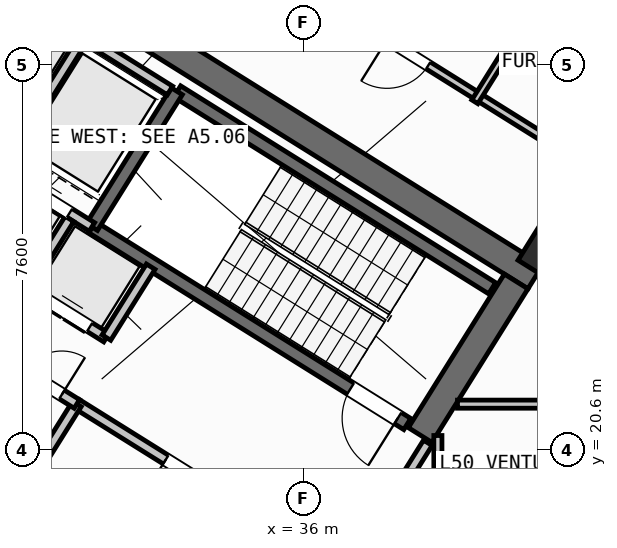
"""IFC4 building model, lengths in metres.
Left out: names, types, materials, properties, quantities, classifications, styles, units other than length and angle.
Written with IfcOpenShell. Run it as: python <this file> out.ifc"""

import sys

from ifc_helpers import new_model, si_unit, direction, frame, frame_2d, origin, origin_2d, place, context, subcontext, project, spatial, rectangle, hollow_rectangle, extrude, source, transform, mapped, element, fill, save


model = new_model("IFC4")
c1 = context("Model", 3, precision=1e-05, world=origin(), true_north=direction((0.0, 1.0)))
c2 = subcontext(c1, "Body", "Model", "MODEL_VIEW")
j1 = project(units=[si_unit("LENGTHUNIT", "METRE"), si_unit("PLANEANGLEUNIT", "RADIAN")], contexts=[c1])
p1 = place(None, origin())
s1 = spatial("IfcSite", under=j1, at=p1, CompositionType="ELEMENT")
p2 = place(p1, origin())
s2 = spatial("IfcBuilding", under=s1, at=p2, CompositionType="ELEMENT")
p3 = place(p2, frame((0.0, 0.0, 199.5)))
s3 = spatial("IfcBuildingStorey", under=s2, at=p3, CompositionType="ELEMENT", Elevation=199.5)
p4 = place(p3, frame((40.573, 24.01, 0.0), z_axis=(0.0, 0.0, 1.0), x_axis=(-0.848047359947, 0.529920442413, 0.0)))
e1 = element("IfcWall", 1, at=p4, inside=s3, PredefinedType="SHEAR", context=c2, shape_type="SweptSolid", body=[
    extrude(rectangle(XDim=13.14, YDim=0.55, at=frame_2d((6.57, 0.0))), origin(), (0.0, 0.0, 1.0), 4.25),
])
p5 = place(p3, frame((40.194, 23.922, 0.0), z_axis=(0.0, 0.0, 1.0), x_axis=(-0.529888438328, -0.848067357541, 0.0)))
e2 = element("IfcWall", 2, at=p5, inside=s3, PredefinedType="SHEAR", context=c2, shape_type="SweptSolid", body=[
    extrude(rectangle(XDim=3.575, YDim=0.55, at=frame_2d((1.788, 0.0))), origin(), (0.0, 0.0, 1.0), 4.25),
])
m1 = source(origin(), c2, "Body", "SweptSolid", [
    extrude(hollow_rectangle(XDim=0.8, YDim=0.8, WallThickness=0.032, at=origin_2d()), origin(), (0.0, 0.0, 1.0), 4.5),
])
p6 = place(p3, frame((40.783, 24.469, 0.0), z_axis=(0.0, 0.0, 1.0), x_axis=(-0.848048096156, 0.529919264233, 0.0)))
e3 = element("IfcColumn", 3, at=p6, inside=s3, PredefinedType="COLUMN", context=c2, shape_type="MappedRepresentation", body=[
    mapped(m1, transform((0.0, 0.0, 0.0), scale=1.0)),
])
p7 = place(p3, frame((31.76, 12.183, 0.0), z_axis=(0.0, 0.0, 1.0), x_axis=(-0.848047074256, 0.529920899612, 0.0)))
e4 = element("IfcWall", 4, at=p7, inside=s3, PredefinedType="STANDARD", context=c2, shape_type="SweptSolid", body=[
    extrude(rectangle(XDim=30.652, YDim=0.32, at=frame_2d((15.326, 0.0))), origin(), (0.0, 0.0, 1.0), 4.25),
])
p8 = place(p7, frame((15.166, 0.0, 0.0)))
e5 = element("IfcOpeningElement", 5, at=p8, cuts=e4, PredefinedType="OPENING", context=c2, shape_type="SweptSolid", body=[
    extrude(rectangle(XDim=1.2, YDim=2.15, at=frame_2d((0.6, 1.075))), frame((0.0, 0.17, 0.0), z_axis=(0.0, -1.0, 0.0), x_axis=(1.0, 0.0, 0.0)), (0.0, 0.0, 1.0), 0.34),
])
p9 = place(p7, frame((1.665, 0.0, 0.65)))
e6 = element("IfcOpeningElement", 6, at=p9, cuts=e4, PredefinedType="OPENING", context=c2, shape_type="SweptSolid", body=[
    extrude(rectangle(XDim=2.8, YDim=2.1, at=frame_2d((1.4, 1.05))), frame((0.0, 0.17, 0.0), z_axis=(0.0, -1.0, 0.0), x_axis=(1.0, 0.0, 0.0)), (0.0, 0.0, 1.0), 0.34),
])
p10 = place(p7, frame((6.894, 0.0, 0.65)))
e7 = element("IfcOpeningElement", 7, at=p10, cuts=e4, PredefinedType="OPENING", context=c2, shape_type="SweptSolid", body=[
    extrude(rectangle(XDim=2.8, YDim=2.1, at=frame_2d((1.4, 1.05))), frame((0.0, 0.17, 0.0), z_axis=(0.0, -1.0, 0.0), x_axis=(1.0, 0.0, 0.0)), (0.0, 0.0, 1.0), 0.34),
])
p11 = place(p7, frame((20.453, 0.0, 0.85)))
e8 = element("IfcOpeningElement", 8, at=p11, cuts=e4, PredefinedType="OPENING", context=c2, shape_type="SweptSolid", body=[
    extrude(rectangle(XDim=1.5, YDim=1.5, at=frame_2d((0.75, 0.75))), frame((0.0, 0.17, 0.0), z_axis=(0.0, -1.0, 0.0), x_axis=(1.0, 0.0, 0.0)), (0.0, 0.0, 1.0), 0.34),
])
p12 = place(p7, frame((26.258, 0.0, 0.65)))
e9 = element("IfcOpeningElement", 9, at=p12, cuts=e4, PredefinedType="OPENING", context=c2, shape_type="SweptSolid", body=[
    extrude(rectangle(XDim=2.8, YDim=2.1, at=frame_2d((1.4, 1.05))), frame((0.0, 0.17, 0.0), z_axis=(0.0, -1.0, 0.0), x_axis=(1.0, 0.0, 0.0)), (0.0, 0.0, 1.0), 0.34),
])
p13 = place(p3, frame((31.28, 18.261, 0.0), z_axis=(0.0, 0.0, 1.0), x_axis=(-0.848051618787, 0.529913626805, 0.0)))
e10 = element("IfcWall", 10, at=p13, inside=s3, PredefinedType="SHEAR", context=c2, shape_type="SweptSolid", body=[
    extrude(rectangle(XDim=7.46, YDim=0.26, at=frame_2d((3.73, 0.0))), origin(), (0.0, 0.0, 1.0), 4.25),
])
p14 = place(p13, frame((0.36, 0.0, 0.0)))
e11 = element("IfcOpeningElement", 11, at=p14, cuts=e10, PredefinedType="OPENING", context=c2, shape_type="SweptSolid", body=[
    extrude(rectangle(XDim=0.86, YDim=2.05, at=frame_2d((0.43, 1.025))), frame((0.0, 0.14, 0.0), z_axis=(0.0, -1.0, 0.0), x_axis=(1.0, 0.0, 0.0)), (0.0, 0.0, 1.0), 0.28),
])
p15 = place(p3, frame((39.721, 23.788, 0.0), z_axis=(0.0, 0.0, 1.0), x_axis=(-0.848054434086, 0.529909121291, 0.0)))
e12 = element("IfcWall", 12, at=p15, inside=s3, PredefinedType="SHEAR", context=c2, shape_type="SweptSolid", body=[
    extrude(rectangle(XDim=7.33, YDim=0.26, at=frame_2d((3.665, 0.0))), origin(), (0.0, 0.0, 1.0), 4.25),
])
p16 = place(p3, frame((38.046, 21.108, 0.0), z_axis=(0.0, 0.0, 1.0), x_axis=(-0.848054434086, 0.529909121291, 0.0)))
e13 = element("IfcWall", 13, at=p16, inside=s3, PredefinedType="SHEAR", context=c2, shape_type="SweptSolid", body=[
    extrude(rectangle(XDim=7.33, YDim=0.26, at=frame_2d((3.665, 0.0))), origin(), (0.0, 0.0, 1.0), 4.25),
])
p17 = place(p16, frame((0.22, 0.0, 0.0)))
e14 = element("IfcOpeningElement", 14, at=p17, cuts=e13, PredefinedType="OPENING", context=c2, shape_type="SweptSolid", body=[
    extrude(rectangle(XDim=1.1, YDim=2.1, at=frame_2d((0.55, 1.05))), frame((0.0, 0.14, 0.0), z_axis=(0.0, -1.0, 0.0), x_axis=(1.0, 0.0, 0.0)), (0.0, 0.0, 1.0), 0.28),
])
p18 = place(p3, frame((33.496, 27.677, 0.0), z_axis=(0.0, 0.0, 1.0), x_axis=(-0.529908658664, -0.84805472316, 0.0)))
e15 = element("IfcWall", 15, at=p18, inside=s3, PredefinedType="SHEAR", context=c2, shape_type="SweptSolid", body=[
    extrude(rectangle(XDim=3.16, YDim=0.26, at=frame_2d((1.58, 0.0))), origin(), (0.0, 0.0, 1.0), 4.25),
])
p19 = place(p3, frame((36.417, 18.447, 0.0), z_axis=(0.0, 0.0, 1.0), x_axis=(-0.848064879198, 0.529892404805, 0.0)))
e16 = element("IfcWall", 16, at=p19, inside=s3, PredefinedType="STANDARD", context=c2, shape_type="SweptSolid", body=[
    extrude(rectangle(XDim=5.768, YDim=0.2, at=frame_2d((2.884, 0.0))), origin(), (0.0, 0.0, 1.0), 4.24),
])
p20 = place(p19, frame((2.548, 0.0, 0.0)))
e17 = element("IfcOpeningElement", 17, at=p20, cuts=e16, PredefinedType="OPENING", context=c2, shape_type="SweptSolid", body=[
    extrude(rectangle(XDim=1.15, YDim=2.1, at=frame_2d((0.575, 1.05))), frame((0.0, 0.11, 0.0), z_axis=(0.0, -1.0, 0.0), x_axis=(1.0, 0.0, 0.0)), (0.0, 0.0, 1.0), 0.22),
])
p21 = place(p3, frame((31.822, 24.998, 0.0), z_axis=(0.0, 0.0, 1.0), x_axis=(-0.848036912365, 0.52993716162, 0.0)))
e18 = element("IfcWall", 18, at=p21, inside=s3, PredefinedType="STANDARD", context=c2, shape_type="SweptSolid", body=[
    extrude(rectangle(XDim=4.618, YDim=0.2, at=frame_2d((2.309, 0.0))), origin(), (0.0, 0.0, 1.0), 4.24),
])
p22 = place(p21, frame((0.52, 0.0, 0.0)))
e19 = element("IfcOpeningElement", 19, at=p22, cuts=e18, PredefinedType="OPENING", context=c2, shape_type="SweptSolid", body=[
    extrude(rectangle(XDim=1.2, YDim=2.15, at=frame_2d((0.6, 1.075))), frame((0.0, 0.11, 0.0), z_axis=(0.0, -1.0, 0.0), x_axis=(1.0, 0.0, 0.0)), (0.0, 0.0, 1.0), 0.22),
])
p23 = place(p21, frame((2.66, 0.0, 0.0)))
e20 = element("IfcOpeningElement", 20, at=p23, cuts=e18, PredefinedType="OPENING", context=c2, shape_type="SweptSolid", body=[
    extrude(rectangle(XDim=1.2, YDim=2.15, at=frame_2d((0.6, 1.075))), frame((0.0, 0.11, 0.0), z_axis=(0.0, -1.0, 0.0), x_axis=(1.0, 0.0, 0.0)), (0.0, 0.0, 1.0), 0.22),
])
p24 = place(p3, frame((32.108, 22.814, 0.0), z_axis=(0.0, 0.0, 1.0), x_axis=(-0.848042229521, 0.529928652696, 0.0)))
e21 = element("IfcWall", 21, at=p24, inside=s3, PredefinedType="STANDARD", context=c2, shape_type="SweptSolid", body=[
    extrude(rectangle(XDim=5.62, YDim=0.2, at=frame_2d((2.81, 0.0))), origin(), (0.0, 0.0, 1.0), 4.24),
])
p25 = place(p24, frame((0.39, 0.0, 0.0)))
e22 = element("IfcOpeningElement", 22, at=p25, cuts=e21, PredefinedType="OPENING", context=c2, shape_type="SweptSolid", body=[
    extrude(rectangle(XDim=1.1, YDim=2.15, at=frame_2d((0.55, 1.075))), frame((0.0, 0.11, 0.0), z_axis=(0.0, -1.0, 0.0), x_axis=(1.0, 0.0, 0.0)), (0.0, 0.0, 1.0), 0.22),
])
p26 = place(p24, frame((2.25, 0.0, 0.0)))
e23 = element("IfcOpeningElement", 23, at=p26, cuts=e21, PredefinedType="OPENING", context=c2, shape_type="SweptSolid", body=[
    extrude(rectangle(XDim=1.1, YDim=2.15, at=frame_2d((0.55, 1.075))), frame((0.0, 0.11, 0.0), z_axis=(0.0, -1.0, 0.0), x_axis=(1.0, 0.0, 0.0)), (0.0, 0.0, 1.0), 0.22),
])
p27 = place(p24, frame((4.11, 0.0, 0.0)))
e24 = element("IfcOpeningElement", 24, at=p27, cuts=e21, PredefinedType="OPENING", context=c2, shape_type="SweptSolid", body=[
    extrude(rectangle(XDim=1.1, YDim=2.15, at=frame_2d((0.55, 1.075))), frame((0.0, 0.11, 0.0), z_axis=(0.0, -1.0, 0.0), x_axis=(1.0, 0.0, 0.0)), (0.0, 0.0, 1.0), 0.22),
])
p28 = place(p3, frame((32.982, 24.213, 0.0), z_axis=(0.0, 0.0, 1.0), x_axis=(-0.529839334948, -0.84809803628, 0.0)))
e25 = element("IfcWall", 25, at=p28, inside=s3, PredefinedType="STANDARD", context=c2, shape_type="SweptSolid", body=[
    extrude(rectangle(XDim=1.65, YDim=0.2, at=frame_2d((0.825, 0.0))), origin(), (0.0, 0.0, 1.0), 4.24),
])
p29 = place(p3, frame((31.645, 28.716, 0.0), z_axis=(0.0, 0.0, 1.0), x_axis=(-0.52986693015, -0.848080795876, 0.0)))
e26 = element("IfcWall", 26, at=p29, inside=s3, PredefinedType="STANDARD", context=c2, shape_type="SweptSolid", body=[
    extrude(rectangle(XDim=2.66, YDim=0.2, at=frame_2d((1.33, 0.0))), origin(), (0.0, 0.0, 1.0), 4.24),
])
p30 = place(p3, frame((33.363, 27.69, 0.0), z_axis=(0.0, 0.0, 1.0), x_axis=(-0.848047090064, 0.529920874315, 0.0)))
e27 = element("IfcWall", 27, at=p30, inside=s3, PredefinedType="STANDARD", context=c2, shape_type="SweptSolid", body=[
    extrude(rectangle(XDim=4.498, YDim=0.2, at=frame_2d((2.249, 0.0))), origin(), (0.0, 0.0, 1.0), 4.24),
])
p31 = place(p3, frame((31.379, 25.156, 0.0), z_axis=(0.0, 0.0, 1.0), x_axis=(-0.529998940003, -0.847998304005, 0.0)))
e28 = element("IfcWall", 28, at=p31, inside=s3, PredefinedType="STANDARD", context=c2, shape_type="SweptSolid", body=[
    extrude(rectangle(XDim=1.58, YDim=0.2, at=frame_2d((0.79, 0.0))), origin(), (0.0, 0.0, 1.0), 4.24),
])
p32 = place(p3, frame((31.525, 21.504, 0.0), z_axis=(0.0, 0.0, 1.0), x_axis=(-0.529907497854, -0.848055448493, 0.0)))
e29 = element("IfcWall", 29, at=p32, inside=s3, PredefinedType="STANDARD", context=c2, shape_type="SweptSolid", body=[
    extrude(rectangle(XDim=2.88, YDim=0.2, at=frame_2d((1.44, 0.0))), origin(), (0.0, 0.0, 1.0), 4.24),
])
p33 = place(p3, frame((31.525, 21.504, 0.0), z_axis=(0.0, 0.0, 1.0), x_axis=(-0.848040211232, 0.529931882541, 0.0)))
e30 = element("IfcWall", 30, at=p33, inside=s3, PredefinedType="STANDARD", context=c2, shape_type="SweptSolid", body=[
    extrude(rectangle(XDim=6.218, YDim=0.2, at=frame_2d((3.109, 0.0))), origin(), (0.0, 0.0, 1.0), 4.24),
])
p34 = place(p33, frame((4.4, 0.0, 0.0)))
e31 = element("IfcOpeningElement", 31, at=p34, cuts=e30, PredefinedType="OPENING", context=c2, shape_type="SweptSolid", body=[
    extrude(rectangle(XDim=0.86, YDim=2.05, at=frame_2d((0.43, 1.025))), frame((0.0, 0.11, 0.0), z_axis=(0.0, -1.0, 0.0), x_axis=(1.0, 0.0, 0.0)), (0.0, 0.0, 1.0), 0.22),
])
p35 = place(p33, frame((0.35, 0.0, 0.0)))
e32 = element("IfcOpeningElement", 32, at=p35, cuts=e30, PredefinedType="OPENING", context=c2, shape_type="SweptSolid", body=[
    extrude(rectangle(XDim=0.86, YDim=2.05, at=frame_2d((0.43, 1.025))), frame((0.0, 0.11, 0.0), z_axis=(0.0, -1.0, 0.0), x_axis=(1.0, 0.0, 0.0)), (0.0, 0.0, 1.0), 0.22),
])
p36 = place(p3, frame((31.239, 38.274, 0.0), z_axis=(0.0, 0.0, 1.0), x_axis=(-0.529918877109, -0.848048338059, 0.0)))
e33 = element("IfcWall", 33, at=p36, inside=s3, PredefinedType="PARTITIONING", context=c2, shape_type="SweptSolid", body=[
    extrude(rectangle(XDim=15.35, YDim=0.16, at=frame_2d((7.675, 0.0))), origin(), (0.0, 0.0, 1.0), 4.24),
])
p37 = place(p3, frame((41.936, 26.012, 0.0), z_axis=(0.0, 0.0, 1.0), x_axis=(-0.848051154596, 0.529914369676, 0.0)))
e34 = element("IfcWall", 34, at=p37, inside=s3, PredefinedType="PARTITIONING", context=c2, shape_type="SweptSolid", body=[
    extrude(rectangle(XDim=15.57, YDim=0.16, at=frame_2d((7.785, 0.0))), origin(), (0.0, 0.0, 1.0), 4.24),
])
p38 = place(p37, frame((4.1, 0.0, 0.0)))
e35 = element("IfcOpeningElement", 35, at=p38, cuts=e34, PredefinedType="OPENING", context=c2, shape_type="SweptSolid", body=[
    extrude(rectangle(XDim=0.96, YDim=2.08, at=frame_2d((0.48, 1.04))), frame((0.0, 0.09, 0.0), z_axis=(0.0, -1.0, 0.0), x_axis=(1.0, 0.0, 0.0)), (0.0, 0.0, 1.0), 0.18),
])
p39 = place(p37, frame((8.2, 0.0, 0.0)))
e36 = element("IfcOpeningElement", 36, at=p39, cuts=e34, PredefinedType="OPENING", context=c2, shape_type="SweptSolid", body=[
    extrude(rectangle(XDim=1.7, YDim=2.2, at=frame_2d((0.85, 1.1))), frame((0.0, 0.09, 0.0), z_axis=(0.0, -1.0, 0.0), x_axis=(1.0, 0.0, 0.0)), (0.0, 0.0, 1.0), 0.18),
])
p40 = place(p3, frame((40.512, 29.281, 0.0), z_axis=(0.0, 0.0, 1.0), x_axis=(-0.529947607416, -0.848030384712, 0.0)))
e37 = element("IfcWall", 37, at=p40, inside=s3, PredefinedType="PLUMBINGWALL", context=c2, shape_type="SweptSolid", body=[
    extrude(rectangle(XDim=2.138, YDim=0.14, at=frame_2d((1.069, 0.0))), origin(), (0.0, 0.0, 1.0), 4.24),
])
p41 = place(p3, frame((38.451, 20.737, 0.0), z_axis=(0.0, 0.0, 1.0), x_axis=(-0.529924799939, -0.848044637038, 0.0)))
e38 = element("IfcWall", 38, at=p41, inside=s3, PredefinedType="STANDARD", context=c2, shape_type="SweptSolid", body=[
    extrude(rectangle(XDim=2.96, YDim=0.2, at=frame_2d((1.48, 0.0))), origin(), (0.0, 0.0, 1.0), 4.24),
])
p42 = place(p41, frame((1.46, 0.0, 0.0)))
e39 = element("IfcOpeningElement", 39, at=p42, cuts=e38, PredefinedType="OPENING", context=c2, shape_type="SweptSolid", body=[
    extrude(rectangle(XDim=0.86, YDim=2.05, at=frame_2d((0.43, 1.025))), frame((0.0, 0.11, 0.0), z_axis=(0.0, -1.0, 0.0), x_axis=(1.0, 0.0, 0.0)), (0.0, 0.0, 1.0), 0.22),
])
p43 = place(p3, frame((38.65, 17.93, 0.0), z_axis=(0.0, 0.0, 1.0), x_axis=(0.0, 1.0, 0.0)))
e40 = element("IfcWall", 40, at=p43, inside=s3, PredefinedType="PARTITIONING", context=c2, shape_type="SweptSolid", body=[
    extrude(rectangle(XDim=2.951, YDim=0.16, at=frame_2d((1.476, 0.0))), origin(), (0.0, 0.0, 1.0), 4.24),
])
p44 = place(p3, frame((39.037, 21.5, 0.0), z_axis=(0.0, 0.0, 1.0), x_axis=(1.0, 0.0, 0.0)))
e41 = element("IfcWall", 41, at=p44, inside=s3, PredefinedType="PARTITIONING", context=c2, shape_type="SweptSolid", body=[
    extrude(rectangle(XDim=7.215, YDim=0.16, at=frame_2d((3.607, 0.0))), origin(), (0.0, 0.0, 1.0), 4.24),
])
m2 = source(origin(), c2, "Body", "SweptSolid", [
    extrude(rectangle(XDim=1.1, YDim=2.1, at=frame_2d((0.55, 1.05))), frame((0.0, 0.025, 0.0), z_axis=(0.0, -1.0, 0.0), x_axis=(1.0, 0.0, 0.0)), (0.0, 0.0, 1.0), 0.05),
])
p45 = place(p17, origin())
e42 = element("IfcDoor", 42, at=p45, inside=s3, OperationType="SINGLE_SWING_LEFT", PredefinedType="DOOR", context=c2, shape_type="MappedRepresentation", body=[
    mapped(m2, transform((0.0, 0.0, 0.0), scale=1.0)),
])
fill(e14, e42)
m3 = source(origin(), c2, "Body", "SweptSolid", [
    extrude(rectangle(XDim=1.15, YDim=2.1, at=frame_2d((0.575, 1.05))), frame((0.0, 0.025, 0.0), z_axis=(0.0, -1.0, 0.0), x_axis=(1.0, 0.0, 0.0)), (0.0, 0.0, 1.0), 0.05),
])
p46 = place(p20, origin())
e43 = element("IfcDoor", 43, at=p46, inside=s3, OperationType="SINGLE_SWING_RIGHT", PredefinedType="DOOR", context=c2, shape_type="MappedRepresentation", body=[
    mapped(m3, transform((0.0, 0.0, 0.0), scale=1.0)),
])
fill(e17, e43)
m4 = source(origin(), c2, "Body", "SweptSolid", [
    extrude(rectangle(XDim=1.2, YDim=2.15, at=frame_2d((0.6, 1.075))), frame((0.0, 0.025, 0.0), z_axis=(0.0, -1.0, 0.0), x_axis=(1.0, 0.0, 0.0)), (0.0, 0.0, 1.0), 0.05),
])
p47 = place(p22, origin())
e44 = element("IfcDoor", 44, at=p47, inside=s3, OperationType="DOUBLE_DOOR_SLIDING", PredefinedType="DOOR", context=c2, shape_type="MappedRepresentation", body=[
    mapped(m4, transform((0.0, 0.0, 0.0), scale=1.0)),
])
fill(e19, e44)
m5 = source(origin(), c2, "Body", "SweptSolid", [
    extrude(rectangle(XDim=1.1, YDim=2.15, at=frame_2d((0.55, 1.075))), frame((0.0, 0.025, 0.0), z_axis=(0.0, -1.0, 0.0), x_axis=(1.0, 0.0, 0.0)), (0.0, 0.0, 1.0), 0.05),
])
p48 = place(p25, origin())
e45 = element("IfcDoor", 45, at=p48, inside=s3, OperationType="DOUBLE_DOOR_SLIDING", PredefinedType="DOOR", context=c2, shape_type="MappedRepresentation", body=[
    mapped(m5, transform((0.0, 0.0, 0.0), scale=1.0)),
])
fill(e22, e45)
m6 = source(origin(), c2, "Body", "SweptSolid", [
    extrude(rectangle(XDim=0.86, YDim=2.05, at=frame_2d((0.43, 1.025))), frame((0.0, 0.025, 0.0), z_axis=(0.0, -1.0, 0.0), x_axis=(1.0, 0.0, 0.0)), (0.0, 0.0, 1.0), 0.05),
])
p49 = place(p35, frame((0.86, 0.0, 0.0), z_axis=(0.0, 0.0, 1.0), x_axis=(-1.0, 0.0, 0.0)))
e46 = element("IfcDoor", 46, at=p49, inside=s3, OperationType="SINGLE_SWING_RIGHT", PredefinedType="DOOR", context=c2, shape_type="MappedRepresentation", body=[
    mapped(m6, transform((0.0, 0.0, 0.0), scale=1.0)),
])
fill(e32, e46)
m7 = source(origin(), c2, "Body", "SweptSolid", [
    extrude(rectangle(XDim=0.96, YDim=2.08, at=frame_2d((0.48, 1.04))), frame((0.0, 0.025, 0.0), z_axis=(0.0, -1.0, 0.0), x_axis=(1.0, 0.0, 0.0)), (0.0, 0.0, 1.0), 0.05),
])
p50 = place(p38, origin())
e47 = element("IfcDoor", 47, at=p50, inside=s3, OperationType="SINGLE_SWING_RIGHT", PredefinedType="DOOR", context=c2, shape_type="MappedRepresentation", body=[
    mapped(m7, transform((0.0, 0.0, 0.0), scale=1.0)),
])
fill(e35, e47)
save(model, sys.argv[1])
